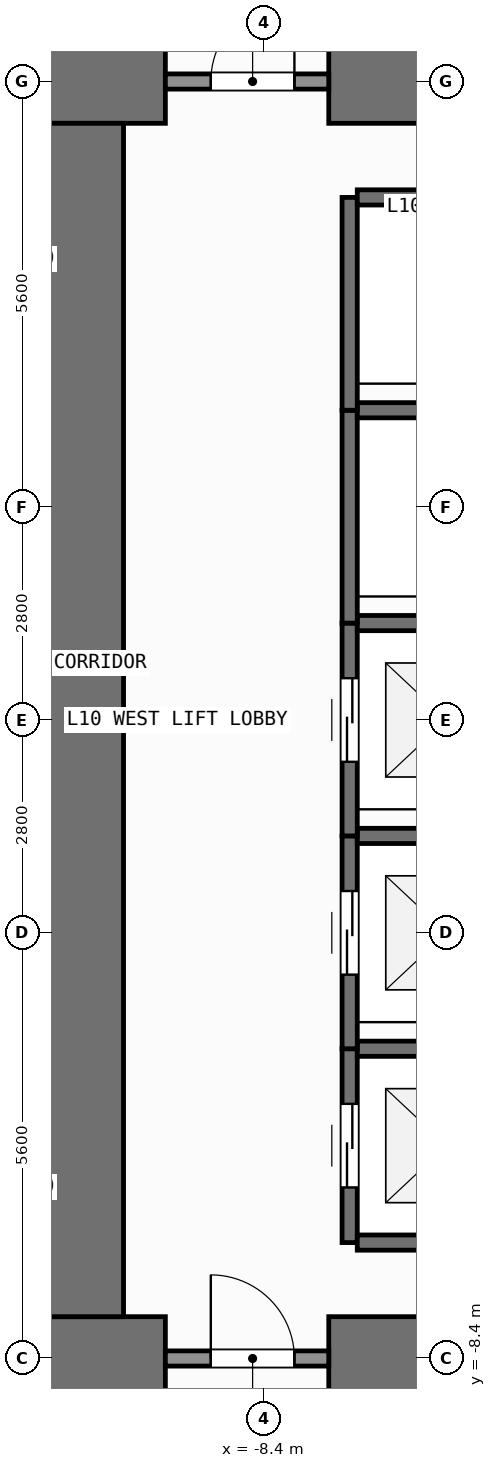
"""IFC4 building model, lengths in metres.
Left out: names, types, materials, properties, quantities, classifications, styles, units other than length and angle.
Written with IfcOpenShell. Run it as: python <this file> out.ifc"""

import sys

from ifc_helpers import new_model, si_unit, direction, frame, frame_2d, origin, place, context, subcontext, project, spatial, rectangle, extrude, element, fill, save


model = new_model("IFC4")
c1 = context("Model", 3, precision=1e-05, world=origin(), true_north=direction((0.0, 1.0)))
c2 = subcontext(c1, "Body", "Model", "MODEL_VIEW")
j1 = project(units=[si_unit("LENGTHUNIT", "METRE"), si_unit("PLANEANGLEUNIT", "RADIAN")], contexts=[c1])
p1 = place(None, origin())
s1 = spatial("IfcSite", under=j1, at=p1, CompositionType="ELEMENT")
p2 = place(p1, origin())
s2 = spatial("IfcBuilding", under=s1, at=p2, CompositionType="ELEMENT")
p3 = place(p2, frame((0.0, 0.0, 38.4)))
s3 = spatial("IfcBuildingStorey", under=s2, at=p3, CompositionType="ELEMENT", Elevation=38.4)
p4 = place(p3, frame((-11.35, -8.4, 0.0), z_axis=(0.0, 0.0, 1.0), x_axis=(1.0, 0.0, 0.0)))
e1 = element("IfcWall", 1, at=p4, inside=s3, PredefinedType="SHEAR", context=c2, shape_type="SweptSolid", body=[
    extrude(rectangle(XDim=1.65, YDim=1.1, at=frame_2d((0.825, 0.0))), origin(), (0.0, 0.0, 1.0), 3.9),
])
p5 = place(p3, frame((-7.55, -8.4, 0.0), z_axis=(0.0, 0.0, 1.0), x_axis=(1.0, 0.0, 0.0)))
e2 = element("IfcWall", 2, at=p5, inside=s3, PredefinedType="SHEAR", context=c2, shape_type="SweptSolid", body=[
    extrude(rectangle(XDim=3.35, YDim=1.1, at=frame_2d((1.675, 0.0))), origin(), (0.0, 0.0, 1.0), 3.9),
])
p6 = place(p3, frame((-11.35, 8.4, 0.0), z_axis=(0.0, 0.0, 1.0), x_axis=(1.0, 0.0, 0.0)))
e3 = element("IfcWall", 3, at=p6, inside=s3, PredefinedType="SHEAR", context=c2, shape_type="SweptSolid", body=[
    extrude(rectangle(XDim=1.65, YDim=1.1, at=frame_2d((0.825, 0.0))), origin(), (0.0, 0.0, 1.0), 3.9),
])
p7 = place(p3, frame((-7.55, 8.4, 0.0), z_axis=(0.0, 0.0, 1.0), x_axis=(1.0, 0.0, 0.0)))
e4 = element("IfcWall", 4, at=p7, inside=s3, PredefinedType="SHEAR", context=c2, shape_type="SweptSolid", body=[
    extrude(rectangle(XDim=16.5, YDim=1.1, at=frame_2d((8.25, 0.0))), origin(), (0.0, 0.0, 1.0), 3.9),
])
p8 = place(p3, frame((-10.8, -7.85, 0.0), z_axis=(0.0, 0.0, 1.0), x_axis=(0.0, 1.0, 0.0)))
e5 = element("IfcWall", 5, at=p8, inside=s3, PredefinedType="SHEAR", context=c2, shape_type="SweptSolid", body=[
    extrude(rectangle(XDim=15.7, YDim=1.1, at=frame_2d((7.85, 0.0))), origin(), (0.0, 0.0, 1.0), 3.9),
])
p9 = place(p3, frame((-7.275, -6.875, 0.0), z_axis=(0.0, 0.0, 1.0), x_axis=(0.0, 1.0, 0.0)))
e6 = element("IfcWall", 6, at=p9, inside=s3, PredefinedType="SHEAR", context=c2, shape_type="SweptSolid", body=[
    extrude(rectangle(XDim=2.55, YDim=0.2, at=frame_2d((1.275, 0.0))), origin(), (0.0, 0.0, 1.0), 3.68),
])
p10 = place(p9, frame((0.725, 0.0, 0.0)))
e7 = element("IfcOpeningElement", 7, at=p10, cuts=e6, PredefinedType="OPENING", context=c2, shape_type="SweptSolid", body=[
    extrude(rectangle(XDim=1.1, YDim=2.2, at=frame_2d((0.55, 1.1))), frame((0.0, 0.11, 0.0), z_axis=(0.0, -1.0, 0.0), x_axis=(1.0, 0.0, 0.0)), (0.0, 0.0, 1.0), 0.22),
])
for number, where, z_axis, x_axis in (
    (8, (-7.175, -6.875, 0.0), (0.0, 0.0, 1.0), (1.0, 0.0, 0.0)),
    (9, (-7.175, -4.325, 0.0), (0.0, 0.0, 1.0), (1.0, 0.0, 0.0)),
):
    element("IfcWall", number, at=place(p3, frame(where, z_axis=z_axis, x_axis=x_axis)), inside=s3, PredefinedType="SHEAR", context=c2, shape_type="SweptSolid", body=[
        extrude(rectangle(XDim=2.35, YDim=0.2, at=frame_2d((1.175, 0.0))), origin(), (0.0, 0.0, 1.0), 3.68),
    ])
p11 = place(p3, frame((-7.275, -4.325, 0.0), z_axis=(0.0, 0.0, 1.0), x_axis=(0.0, 1.0, 0.0)))
e10 = element("IfcWall", 10, at=p11, inside=s3, PredefinedType="SHEAR", context=c2, shape_type="SweptSolid", body=[
    extrude(rectangle(XDim=2.8, YDim=0.2, at=frame_2d((1.4, 0.0))), origin(), (0.0, 0.0, 1.0), 3.68),
])
p12 = place(p11, frame((0.975, 0.0, 0.0)))
e11 = element("IfcOpeningElement", 11, at=p12, cuts=e10, PredefinedType="OPENING", context=c2, shape_type="SweptSolid", body=[
    extrude(rectangle(XDim=1.1, YDim=2.2, at=frame_2d((0.55, 1.1))), frame((0.0, 0.11, 0.0), z_axis=(0.0, -1.0, 0.0), x_axis=(1.0, 0.0, 0.0)), (0.0, 0.0, 1.0), 0.22),
])
p13 = place(p3, frame((-7.175, -1.525, 0.0), z_axis=(0.0, 0.0, 1.0), x_axis=(1.0, 0.0, 0.0)))
e12 = element("IfcWall", 12, at=p13, inside=s3, PredefinedType="SHEAR", context=c2, shape_type="SweptSolid", body=[
    extrude(rectangle(XDim=2.35, YDim=0.2, at=frame_2d((1.175, 0.0))), origin(), (0.0, 0.0, 1.0), 3.68),
])
p14 = place(p3, frame((-7.275, -1.525, 0.0), z_axis=(0.0, 0.0, 1.0), x_axis=(0.0, 1.0, 0.0)))
e13 = element("IfcWall", 13, at=p14, inside=s3, PredefinedType="SHEAR", context=c2, shape_type="SweptSolid", body=[
    extrude(rectangle(XDim=2.8, YDim=0.2, at=frame_2d((1.4, 0.0))), origin(), (0.0, 0.0, 1.0), 3.68),
])
p15 = place(p14, frame((0.975, 0.0, 0.0)))
e14 = element("IfcOpeningElement", 14, at=p15, cuts=e13, PredefinedType="OPENING", context=c2, shape_type="SweptSolid", body=[
    extrude(rectangle(XDim=1.1, YDim=2.2, at=frame_2d((0.55, 1.1))), frame((0.0, 0.11, 0.0), z_axis=(0.0, -1.0, 0.0), x_axis=(1.0, 0.0, 0.0)), (0.0, 0.0, 1.0), 0.22),
])
p16 = place(p3, frame((-7.175, 1.275, 0.0), z_axis=(0.0, 0.0, 1.0), x_axis=(1.0, 0.0, 0.0)))
e15 = element("IfcWall", 15, at=p16, inside=s3, PredefinedType="SHEAR", context=c2, shape_type="SweptSolid", body=[
    extrude(rectangle(XDim=2.35, YDim=0.2, at=frame_2d((1.175, 0.0))), origin(), (0.0, 0.0, 1.0), 3.68),
])
p17 = place(p3, frame((-7.275, 1.275, 0.0), z_axis=(0.0, 0.0, 1.0), x_axis=(0.0, 1.0, 0.0)))
e16 = element("IfcWall", 16, at=p17, inside=s3, PredefinedType="SHEAR", context=c2, shape_type="SweptSolid", body=[
    extrude(rectangle(XDim=2.8, YDim=0.2, at=frame_2d((1.4, 0.0))), origin(), (0.0, 0.0, 1.0), 3.68),
])
p18 = place(p3, frame((-7.175, 4.075, 0.0), z_axis=(0.0, 0.0, 1.0), x_axis=(1.0, 0.0, 0.0)))
e17 = element("IfcWall", 17, at=p18, inside=s3, PredefinedType="SHEAR", context=c2, shape_type="SweptSolid", body=[
    extrude(rectangle(XDim=2.35, YDim=0.2, at=frame_2d((1.175, 0.0))), origin(), (0.0, 0.0, 1.0), 3.68),
])
p19 = place(p3, frame((-7.275, 4.075, 0.0), z_axis=(0.0, 0.0, 1.0), x_axis=(0.0, 1.0, 0.0)))
e18 = element("IfcWall", 18, at=p19, inside=s3, PredefinedType="SHEAR", context=c2, shape_type="SweptSolid", body=[
    extrude(rectangle(XDim=2.8, YDim=0.2, at=frame_2d((1.4, 0.0))), origin(), (0.0, 0.0, 1.0), 3.68),
])
p20 = place(p3, frame((-7.175, 6.875, 0.0), z_axis=(0.0, 0.0, 1.0), x_axis=(1.0, 0.0, 0.0)))
e19 = element("IfcWall", 19, at=p20, inside=s3, PredefinedType="SHEAR", context=c2, shape_type="SweptSolid", body=[
    extrude(rectangle(XDim=2.35, YDim=0.2, at=frame_2d((1.175, 0.0))), origin(), (0.0, 0.0, 1.0), 3.68),
])
p21 = place(p3, frame((-9.7, -8.4, 0.0), z_axis=(0.0, 0.0, 1.0), x_axis=(1.0, 0.0, 0.0)))
e20 = element("IfcWall", 20, at=p21, inside=s3, PredefinedType="SOLIDWALL", context=c2, shape_type="SweptSolid", body=[
    extrude(rectangle(XDim=2.15, YDim=0.2, at=frame_2d((1.075, 0.0))), origin(), (0.0, 0.0, 1.0), 2.72),
])
p22 = place(p21, frame((0.598, 0.0, 0.0)))
e21 = element("IfcOpeningElement", 21, at=p22, cuts=e20, PredefinedType="OPENING", context=c2, shape_type="SweptSolid", body=[
    extrude(rectangle(XDim=1.1, YDim=2.15, at=frame_2d((0.55, 1.075))), frame((0.0, 0.11, 0.0), z_axis=(0.0, -1.0, 0.0), x_axis=(1.0, 0.0, 0.0)), (0.0, 0.0, 1.0), 0.22),
])
p23 = place(p3, frame((-9.7, 8.4, 0.0), z_axis=(0.0, 0.0, 1.0), x_axis=(1.0, 0.0, 0.0)))
e22 = element("IfcWall", 22, at=p23, inside=s3, PredefinedType="SOLIDWALL", context=c2, shape_type="SweptSolid", body=[
    extrude(rectangle(XDim=2.15, YDim=0.2, at=frame_2d((1.075, 0.0))), origin(), (0.0, 0.0, 1.0), 2.72),
])
p24 = place(p23, frame((0.598, 0.0, 0.0)))
e23 = element("IfcOpeningElement", 23, at=p24, cuts=e22, PredefinedType="OPENING", context=c2, shape_type="SweptSolid", body=[
    extrude(rectangle(XDim=1.1, YDim=2.15, at=frame_2d((0.55, 1.075))), frame((0.0, 0.11, 0.0), z_axis=(0.0, -1.0, 0.0), x_axis=(1.0, 0.0, 0.0)), (0.0, 0.0, 1.0), 0.22),
])
p25 = place(p10, origin())
e24 = element("IfcDoor", 24, at=p25, inside=s3, OperationType="SLIDING_TO_LEFT", PredefinedType="DOOR", context=c2, shape_type="SweptSolid", body=[
    extrude(rectangle(XDim=1.1, YDim=2.2, at=frame_2d((0.55, 1.1))), frame((0.0, 0.025, 0.0), z_axis=(0.0, -1.0, 0.0), x_axis=(1.0, 0.0, 0.0)), (0.0, 0.0, 1.0), 0.05),
])
fill(e7, e24)
p26 = place(p12, origin())
e25 = element("IfcDoor", 25, at=p26, inside=s3, OperationType="SLIDING_TO_LEFT", PredefinedType="DOOR", context=c2, shape_type="SweptSolid", body=[
    extrude(rectangle(XDim=1.1, YDim=2.2, at=frame_2d((0.55, 1.1))), frame((0.0, 0.025, 0.0), z_axis=(0.0, -1.0, 0.0), x_axis=(1.0, 0.0, 0.0)), (0.0, 0.0, 1.0), 0.05),
])
fill(e11, e25)
p27 = place(p15, origin())
e26 = element("IfcDoor", 26, at=p27, inside=s3, OperationType="SLIDING_TO_LEFT", PredefinedType="DOOR", context=c2, shape_type="SweptSolid", body=[
    extrude(rectangle(XDim=1.1, YDim=2.2, at=frame_2d((0.55, 1.1))), frame((0.0, 0.025, 0.0), z_axis=(0.0, -1.0, 0.0), x_axis=(1.0, 0.0, 0.0)), (0.0, 0.0, 1.0), 0.05),
])
fill(e14, e26)
p28 = place(p22, origin())
e27 = element("IfcDoor", 27, at=p28, inside=s3, OperationType="SINGLE_SWING_LEFT", PredefinedType="DOOR", context=c2, shape_type="SweptSolid", body=[
    extrude(rectangle(XDim=1.1, YDim=2.15, at=frame_2d((0.55, 1.075))), frame((0.0, 0.025, 0.0), z_axis=(0.0, -1.0, 0.0), x_axis=(1.0, 0.0, 0.0)), (0.0, 0.0, 1.0), 0.05),
])
fill(e21, e27)
p29 = place(p24, origin())
e28 = element("IfcDoor", 28, at=p29, inside=s3, OperationType="SINGLE_SWING_RIGHT", PredefinedType="DOOR", context=c2, shape_type="SweptSolid", body=[
    extrude(rectangle(XDim=1.1, YDim=2.15, at=frame_2d((0.55, 1.075))), frame((0.0, 0.025, 0.0), z_axis=(0.0, -1.0, 0.0), x_axis=(1.0, 0.0, 0.0)), (0.0, 0.0, 1.0), 0.05),
])
fill(e23, e28)
save(model, sys.argv[1])
